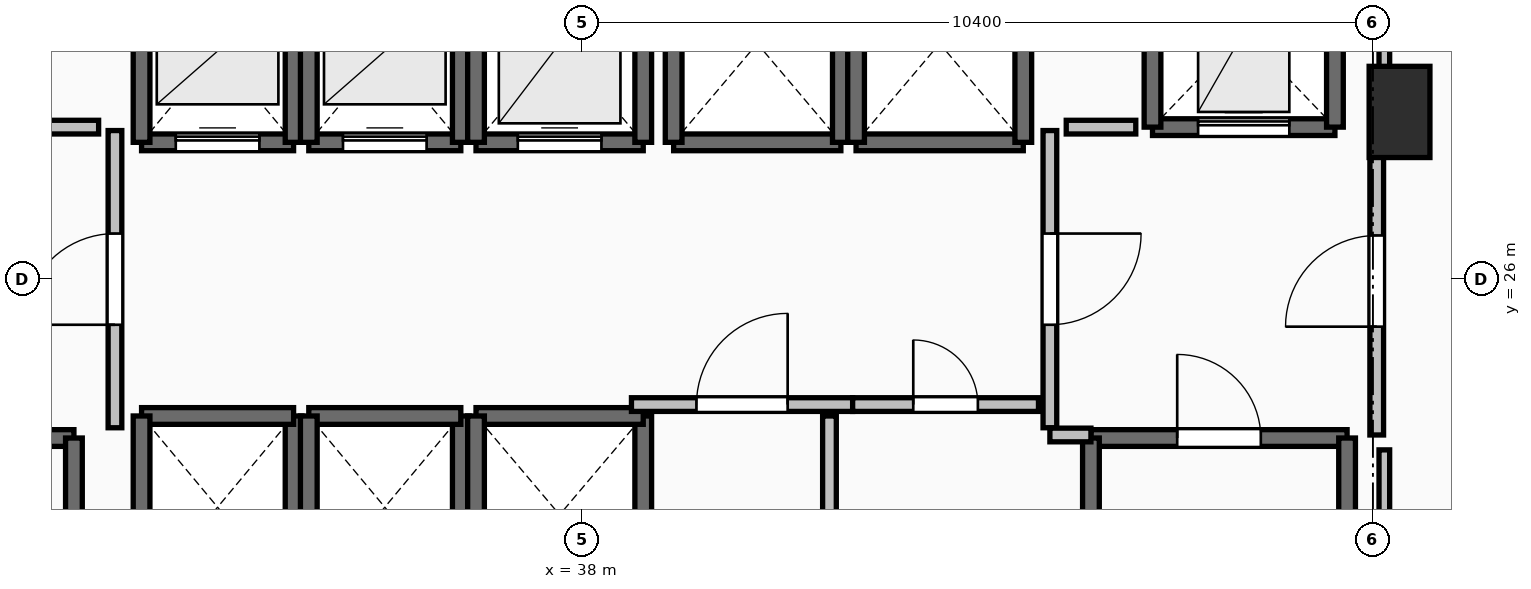
"""IFC4 building model, lengths in metres.
Left out: names, types, materials, properties, quantities, classifications, styles, units other than length and angle.
Written with IfcOpenShell. Run it as: python <this file> out.ifc"""

import sys

from ifc_helpers import new_model, si_unit, direction, frame, frame_2d, origin, origin_2d, place, context, subcontext, project, spatial, rectangle, extrude, element, fill, save


model = new_model("IFC4")
c1 = context("Model", 3, precision=1e-05, world=origin(), true_north=direction((0.0, 1.0)))
c2 = subcontext(c1, "Body", "Model", "MODEL_VIEW")
j1 = project(units=[si_unit("LENGTHUNIT", "METRE"), si_unit("PLANEANGLEUNIT", "RADIAN")], contexts=[c1])
p1 = place(None, origin())
s1 = spatial("IfcSite", under=j1, at=p1, CompositionType="ELEMENT")
p2 = place(p1, origin())
s2 = spatial("IfcBuilding", under=s1, at=p2, CompositionType="ELEMENT")
p3 = place(p2, frame((0.0, 0.0, 120.8)))
s3 = spatial("IfcBuildingStorey", under=s2, at=p3, CompositionType="ELEMENT", Elevation=120.8)
p4 = place(p3, frame((48.75, 28.2, 0.0), z_axis=(0.0, 0.0, 1.0), x_axis=(1.0, 0.0, 0.0)))
e1 = element("IfcColumn", 1, at=p4, inside=s3, PredefinedType="PILASTER", context=c2, shape_type="SweptSolid", body=[
    extrude(rectangle(XDim=0.8, YDim=1.2, at=origin_2d()), origin(), (0.0, 0.0, 1.0), 3.5),
])
p5 = place(p3, frame((27.94, 23.91, 0.0), z_axis=(0.0, 0.0, 1.0), x_axis=(1.0, 0.0, 0.0)))
e2 = element("IfcWall", 2, at=p5, inside=s3, PredefinedType="SOLIDWALL", context=c2, shape_type="SweptSolid", body=[
    extrude(rectangle(XDim=3.37, YDim=0.22, at=frame_2d((1.685, 0.0))), origin(), (0.0, 0.0, 1.0), 3.15),
])
p6 = place(p5, frame((1.135, 0.0, 0.0)))
e3 = element("IfcOpeningElement", 3, at=p6, cuts=e2, PredefinedType="OPENING", context=c2, shape_type="SweptSolid", body=[
    extrude(rectangle(XDim=1.1, YDim=2.15, at=frame_2d((0.55, 1.075))), frame((0.0, 0.125, 0.0), z_axis=(0.0, -1.0, 0.0), x_axis=(1.0, 0.0, 0.0)), (0.0, 0.0, 1.0), 0.25),
])
p7 = place(p3, frame((31.31, 23.91, 0.0), z_axis=(0.0, 0.0, 1.0), x_axis=(0.0, -1.0, 0.0)))
e4 = element("IfcWall", 4, at=p7, inside=s3, PredefinedType="SOLIDWALL", context=c2, shape_type="SweptSolid", body=[
    extrude(rectangle(XDim=7.42, YDim=0.22, at=frame_2d((3.71, 0.0))), origin(), (0.0, 0.0, 1.0), 3.15),
])
p8 = place(p3, frame((44.69, 23.91, 0.0), z_axis=(0.0, 0.0, 1.0), x_axis=(1.0, 0.0, 0.0)))
e5 = element("IfcWall", 5, at=p8, inside=s3, PredefinedType="SOLIDWALL", context=c2, shape_type="SweptSolid", body=[
    extrude(rectangle(XDim=3.37, YDim=0.22, at=frame_2d((1.685, 0.0))), origin(), (0.0, 0.0, 1.0), 3.15),
])
p9 = place(p8, frame((1.135, 0.0, 0.0)))
e6 = element("IfcOpeningElement", 6, at=p9, cuts=e5, PredefinedType="OPENING", context=c2, shape_type="SweptSolid", body=[
    extrude(rectangle(XDim=1.1, YDim=2.15, at=frame_2d((0.55, 1.075))), frame((0.0, 0.125, 0.0), z_axis=(0.0, -1.0, 0.0), x_axis=(1.0, 0.0, 0.0)), (0.0, 0.0, 1.0), 0.25),
])
for number, where, z_axis, x_axis in (
    (7, (48.06, 23.91, 0.0), (0.0, 0.0, 1.0), (0.0, -1.0, 0.0)),
    (8, (44.69, 16.49, 0.0), (0.0, 0.0, 1.0), (0.0, 1.0, 0.0)),
):
    element("IfcWall", number, at=place(p3, frame(where, z_axis=z_axis, x_axis=x_axis)), inside=s3, PredefinedType="SOLIDWALL", context=c2, shape_type="SweptSolid", body=[
        extrude(rectangle(XDim=7.42, YDim=0.22, at=frame_2d((3.71, 0.0))), origin(), (0.0, 0.0, 1.0), 3.15),
    ])
p10 = place(p3, frame((32.2, 27.8, 0.0), z_axis=(0.0, 0.0, 1.0), x_axis=(1.0, 0.0, 0.0)))
e9 = element("IfcWall", 9, at=p10, inside=s3, PredefinedType="SOLIDWALL", context=c2, shape_type="SweptSolid", body=[
    extrude(rectangle(XDim=2.0, YDim=0.22, at=frame_2d((1.0, 0.0))), origin(), (0.0, 0.0, 1.0), 3.15),
])
p11 = place(p10, frame((0.45, 0.0, 0.0)))
e10 = element("IfcOpeningElement", 10, at=p11, cuts=e9, PredefinedType="OPENING", context=c2, shape_type="SweptSolid", body=[
    extrude(rectangle(XDim=1.1, YDim=2.2, at=frame_2d((0.55, 1.1))), frame((0.0, 0.125, 0.0), z_axis=(0.0, -1.0, 0.0), x_axis=(1.0, 0.0, 0.0)), (0.0, 0.0, 1.0), 0.25),
])
for number, where, z_axis, x_axis in (
    (11, (34.2, 27.8, 0.0), (0.0, 0.0, 1.0), (0.0, 1.0, 0.0)),
    (12, (32.2, 30.2, 0.0), (0.0, 0.0, 1.0), (0.0, -1.0, 0.0)),
):
    element("IfcWall", number, at=place(p3, frame(where, z_axis=z_axis, x_axis=x_axis)), inside=s3, PredefinedType="SOLIDWALL", context=c2, shape_type="SweptSolid", body=[
        extrude(rectangle(XDim=2.4, YDim=0.22, at=frame_2d((1.2, 0.0))), origin(), (0.0, 0.0, 1.0), 3.15),
    ])
p12 = place(p3, frame((34.4, 27.8, 0.0), z_axis=(0.0, 0.0, 1.0), x_axis=(1.0, 0.0, 0.0)))
e13 = element("IfcWall", 13, at=p12, inside=s3, PredefinedType="SOLIDWALL", context=c2, shape_type="SweptSolid", body=[
    extrude(rectangle(XDim=2.0, YDim=0.22, at=frame_2d((1.0, 0.0))), origin(), (0.0, 0.0, 1.0), 3.15),
])
p13 = place(p12, frame((0.45, 0.0, 0.0)))
e14 = element("IfcOpeningElement", 14, at=p13, cuts=e13, PredefinedType="OPENING", context=c2, shape_type="SweptSolid", body=[
    extrude(rectangle(XDim=1.1, YDim=2.2, at=frame_2d((0.55, 1.1))), frame((0.0, 0.125, 0.0), z_axis=(0.0, -1.0, 0.0), x_axis=(1.0, 0.0, 0.0)), (0.0, 0.0, 1.0), 0.25),
])
for number, where, z_axis, x_axis in (
    (15, (36.4, 27.8, 0.0), (0.0, 0.0, 1.0), (0.0, 1.0, 0.0)),
    (16, (34.4, 30.2, 0.0), (0.0, 0.0, 1.0), (0.0, -1.0, 0.0)),
):
    element("IfcWall", number, at=place(p3, frame(where, z_axis=z_axis, x_axis=x_axis)), inside=s3, PredefinedType="SOLIDWALL", context=c2, shape_type="SweptSolid", body=[
        extrude(rectangle(XDim=2.4, YDim=0.22, at=frame_2d((1.2, 0.0))), origin(), (0.0, 0.0, 1.0), 3.15),
    ])
p14 = place(p3, frame((36.6, 27.8, 0.0), z_axis=(0.0, 0.0, 1.0), x_axis=(1.0, 0.0, 0.0)))
e17 = element("IfcWall", 17, at=p14, inside=s3, PredefinedType="SOLIDWALL", context=c2, shape_type="SweptSolid", body=[
    extrude(rectangle(XDim=2.2, YDim=0.22, at=frame_2d((1.1, 0.0))), origin(), (0.0, 0.0, 1.0), 3.15),
])
p15 = place(p14, frame((0.55, 0.0, 0.0)))
e18 = element("IfcOpeningElement", 18, at=p15, cuts=e17, PredefinedType="OPENING", context=c2, shape_type="SweptSolid", body=[
    extrude(rectangle(XDim=1.1, YDim=2.2, at=frame_2d((0.55, 1.1))), frame((0.0, 0.125, 0.0), z_axis=(0.0, -1.0, 0.0), x_axis=(1.0, 0.0, 0.0)), (0.0, 0.0, 1.0), 0.25),
])
for number, where, z_axis, x_axis in (
    (19, (38.8, 27.8, 0.0), (0.0, 0.0, 1.0), (0.0, 1.0, 0.0)),
    (20, (36.6, 30.4, 0.0), (0.0, 0.0, 1.0), (0.0, -1.0, 0.0)),
):
    element("IfcWall", number, at=place(p3, frame(where, z_axis=z_axis, x_axis=x_axis)), inside=s3, PredefinedType="SOLIDWALL", context=c2, shape_type="SweptSolid", body=[
        extrude(rectangle(XDim=2.6, YDim=0.22, at=frame_2d((1.3, 0.0))), origin(), (0.0, 0.0, 1.0), 3.15),
    ])
p16 = place(p3, frame((34.2, 21.8, 0.0), z_axis=(0.0, 0.0, 1.0), x_axis=(0.0, 1.0, 0.0)))
e21 = element("IfcWall", 21, at=p16, inside=s3, PredefinedType="SOLIDWALL", context=c2, shape_type="SweptSolid", body=[
    extrude(rectangle(XDim=2.4, YDim=0.22, at=frame_2d((1.2, 0.0))), origin(), (0.0, 0.0, 1.0), 3.15),
])
p17 = place(p3, frame((34.2, 24.2, 0.0), z_axis=(0.0, 0.0, 1.0), x_axis=(-1.0, 0.0, 0.0)))
e22 = element("IfcWall", 22, at=p17, inside=s3, PredefinedType="SOLIDWALL", context=c2, shape_type="SweptSolid", body=[
    extrude(rectangle(XDim=2.0, YDim=0.22, at=frame_2d((1.0, 0.0))), origin(), (0.0, 0.0, 1.0), 3.15),
])
for number, where, z_axis, x_axis in (
    (23, (32.2, 24.2, 0.0), (0.0, 0.0, 1.0), (0.0, -1.0, 0.0)),
    (24, (36.4, 21.8, 0.0), (0.0, 0.0, 1.0), (0.0, 1.0, 0.0)),
):
    element("IfcWall", number, at=place(p3, frame(where, z_axis=z_axis, x_axis=x_axis)), inside=s3, PredefinedType="SOLIDWALL", context=c2, shape_type="SweptSolid", body=[
        extrude(rectangle(XDim=2.4, YDim=0.22, at=frame_2d((1.2, 0.0))), origin(), (0.0, 0.0, 1.0), 3.15),
    ])
p18 = place(p3, frame((36.4, 24.2, 0.0), z_axis=(0.0, 0.0, 1.0), x_axis=(-1.0, 0.0, 0.0)))
e25 = element("IfcWall", 25, at=p18, inside=s3, PredefinedType="SOLIDWALL", context=c2, shape_type="SweptSolid", body=[
    extrude(rectangle(XDim=2.0, YDim=0.22, at=frame_2d((1.0, 0.0))), origin(), (0.0, 0.0, 1.0), 3.15),
])
p19 = place(p3, frame((34.4, 24.2, 0.0), z_axis=(0.0, 0.0, 1.0), x_axis=(0.0, -1.0, 0.0)))
e26 = element("IfcWall", 26, at=p19, inside=s3, PredefinedType="SOLIDWALL", context=c2, shape_type="SweptSolid", body=[
    extrude(rectangle(XDim=2.4, YDim=0.22, at=frame_2d((1.2, 0.0))), origin(), (0.0, 0.0, 1.0), 3.15),
])
p20 = place(p3, frame((38.8, 21.6, 0.0), z_axis=(0.0, 0.0, 1.0), x_axis=(0.0, 1.0, 0.0)))
e27 = element("IfcWall", 27, at=p20, inside=s3, PredefinedType="SOLIDWALL", context=c2, shape_type="SweptSolid", body=[
    extrude(rectangle(XDim=2.6, YDim=0.22, at=frame_2d((1.3, 0.0))), origin(), (0.0, 0.0, 1.0), 3.15),
])
p21 = place(p3, frame((38.8, 24.2, 0.0), z_axis=(0.0, 0.0, 1.0), x_axis=(-1.0, 0.0, 0.0)))
e28 = element("IfcWall", 28, at=p21, inside=s3, PredefinedType="SOLIDWALL", context=c2, shape_type="SweptSolid", body=[
    extrude(rectangle(XDim=2.2, YDim=0.22, at=frame_2d((1.1, 0.0))), origin(), (0.0, 0.0, 1.0), 3.15),
])
p22 = place(p3, frame((36.6, 24.2, 0.0), z_axis=(0.0, 0.0, 1.0), x_axis=(0.0, -1.0, 0.0)))
e29 = element("IfcWall", 29, at=p22, inside=s3, PredefinedType="SOLIDWALL", context=c2, shape_type="SweptSolid", body=[
    extrude(rectangle(XDim=2.6, YDim=0.22, at=frame_2d((1.3, 0.0))), origin(), (0.0, 0.0, 1.0), 3.15),
])
p23 = place(p3, frame((39.2, 27.8, 0.0), z_axis=(0.0, 0.0, 1.0), x_axis=(1.0, 0.0, 0.0)))
e30 = element("IfcWall", 30, at=p23, inside=s3, PredefinedType="SOLIDWALL", context=c2, shape_type="SweptSolid", body=[
    extrude(rectangle(XDim=2.2, YDim=0.22, at=frame_2d((1.1, 0.0))), origin(), (0.0, 0.0, 1.0), 3.15),
])
for number, where, z_axis, x_axis in (
    (31, (41.4, 27.8, 0.0), (0.0, 0.0, 1.0), (0.0, 1.0, 0.0)),
    (32, (39.2, 30.4, 0.0), (0.0, 0.0, 1.0), (0.0, -1.0, 0.0)),
):
    element("IfcWall", number, at=place(p3, frame(where, z_axis=z_axis, x_axis=x_axis)), inside=s3, PredefinedType="SOLIDWALL", context=c2, shape_type="SweptSolid", body=[
        extrude(rectangle(XDim=2.6, YDim=0.22, at=frame_2d((1.3, 0.0))), origin(), (0.0, 0.0, 1.0), 3.15),
    ])
p24 = place(p3, frame((41.6, 27.8, 0.0), z_axis=(0.0, 0.0, 1.0), x_axis=(1.0, 0.0, 0.0)))
e33 = element("IfcWall", 33, at=p24, inside=s3, PredefinedType="SOLIDWALL", context=c2, shape_type="SweptSolid", body=[
    extrude(rectangle(XDim=2.2, YDim=0.22, at=frame_2d((1.1, 0.0))), origin(), (0.0, 0.0, 1.0), 3.15),
])
for number, where, z_axis, x_axis in (
    (34, (43.8, 27.8, 0.0), (0.0, 0.0, 1.0), (0.0, 1.0, 0.0)),
    (35, (41.6, 30.4, 0.0), (0.0, 0.0, 1.0), (0.0, -1.0, 0.0)),
):
    element("IfcWall", number, at=place(p3, frame(where, z_axis=z_axis, x_axis=x_axis)), inside=s3, PredefinedType="SOLIDWALL", context=c2, shape_type="SweptSolid", body=[
        extrude(rectangle(XDim=2.6, YDim=0.22, at=frame_2d((1.3, 0.0))), origin(), (0.0, 0.0, 1.0), 3.15),
    ])
p25 = place(p3, frame((45.5, 28.0, 0.0), z_axis=(0.0, 0.0, 1.0), x_axis=(1.0, 0.0, 0.0)))
e36 = element("IfcWall", 36, at=p25, inside=s3, PredefinedType="SHEAR", context=c2, shape_type="SweptSolid", body=[
    extrude(rectangle(XDim=2.4, YDim=0.22, at=frame_2d((1.2, 0.0))), origin(), (0.0, 0.0, 1.0), 3.15),
])
p26 = place(p25, frame((0.6, 0.0, 0.0)))
e37 = element("IfcOpeningElement", 37, at=p26, cuts=e36, PredefinedType="OPENING", context=c2, shape_type="SweptSolid", body=[
    extrude(rectangle(XDim=1.2, YDim=2.2, at=frame_2d((0.6, 1.1))), frame((0.0, 0.125, 0.0), z_axis=(0.0, -1.0, 0.0), x_axis=(1.0, 0.0, 0.0)), (0.0, 0.0, 1.0), 0.25),
])
for number, where, z_axis, x_axis in (
    (38, (47.9, 28.0, 0.0), (0.0, 0.0, 1.0), (0.0, 1.0, 0.0)),
    (39, (45.5, 30.5, 0.0), (0.0, 0.0, 1.0), (0.0, -1.0, 0.0)),
):
    element("IfcWall", number, at=place(p3, frame(where, z_axis=z_axis, x_axis=x_axis)), inside=s3, PredefinedType="SHEAR", context=c2, shape_type="SweptSolid", body=[
        extrude(rectangle(XDim=2.5, YDim=0.22, at=frame_2d((1.25, 0.0))), origin(), (0.0, 0.0, 1.0), 3.15),
    ])
p27 = place(p3, frame((31.85, 24.045, 0.0), z_axis=(0.0, 0.0, 1.0), x_axis=(0.0, 1.0, 0.0)))
e40 = element("IfcWall", 40, at=p27, inside=s3, PredefinedType="PARTITIONING", context=c2, shape_type="SweptSolid", body=[
    extrude(rectangle(XDim=3.91, YDim=0.18, at=frame_2d((1.955, 0.0))), origin(), (0.0, 0.0, 1.0), 3.15),
])
p28 = place(p27, frame((1.355, 0.0, 0.0)))
e41 = element("IfcOpeningElement", 41, at=p28, cuts=e40, PredefinedType="OPENING", context=c2, shape_type="SweptSolid", body=[
    extrude(rectangle(XDim=1.2, YDim=2.15, at=frame_2d((0.6, 1.075))), frame((0.0, 0.105, 0.0), z_axis=(0.0, -1.0, 0.0), x_axis=(1.0, 0.0, 0.0)), (0.0, 0.0, 1.0), 0.21),
])
p29 = place(p3, frame((44.15, 27.955, 0.0), z_axis=(0.0, 0.0, 1.0), x_axis=(0.0, -1.0, 0.0)))
e42 = element("IfcWall", 42, at=p29, inside=s3, PredefinedType="PARTITIONING", context=c2, shape_type="SweptSolid", body=[
    extrude(rectangle(XDim=3.91, YDim=0.18, at=frame_2d((1.955, 0.0))), origin(), (0.0, 0.0, 1.0), 3.15),
])
p30 = place(p29, frame((1.355, 0.0, 0.0)))
e43 = element("IfcOpeningElement", 43, at=p30, cuts=e42, PredefinedType="OPENING", context=c2, shape_type="SweptSolid", body=[
    extrude(rectangle(XDim=1.2, YDim=2.15, at=frame_2d((0.6, 1.075))), frame((0.0, 0.105, 0.0), z_axis=(0.0, -1.0, 0.0), x_axis=(1.0, 0.0, 0.0)), (0.0, 0.0, 1.0), 0.21),
])
p31 = place(p3, frame((44.15, 23.95, 0.0), z_axis=(0.0, 0.0, 1.0), x_axis=(1.0, 0.0, 0.0)))
e44 = element("IfcWall", 44, at=p31, inside=s3, PredefinedType="PARTITIONING", context=c2, shape_type="SweptSolid", body=[
    extrude(rectangle(XDim=0.54, YDim=0.18, at=frame_2d((0.27, 0.0))), origin(), (0.0, 0.0, 1.0), 3.15),
])
p32 = place(p3, frame((48.45, 23.95, 0.0), z_axis=(0.0, 0.0, 1.0), x_axis=(0.0, 1.0, 0.0)))
e45 = element("IfcWall", 45, at=p32, inside=s3, PredefinedType="PARTITIONING", context=c2, shape_type="SweptSolid", body=[
    extrude(rectangle(XDim=4.05, YDim=0.18, at=frame_2d((2.025, 0.0))), origin(), (0.0, 0.0, 1.0), 3.15),
])
p33 = place(p32, frame((1.425, 0.0, 0.0)))
e46 = element("IfcOpeningElement", 46, at=p33, cuts=e45, PredefinedType="OPENING", context=c2, shape_type="SweptSolid", body=[
    extrude(rectangle(XDim=1.2, YDim=2.15, at=frame_2d((0.6, 1.075))), frame((0.0, 0.105, 0.0), z_axis=(0.0, -1.0, 0.0), x_axis=(1.0, 0.0, 0.0)), (0.0, 0.0, 1.0), 0.21),
])
p34 = place(p3, frame((38.645, 24.35, 0.0), z_axis=(0.0, 0.0, 1.0), x_axis=(1.0, 0.0, 0.0)))
e47 = element("IfcWall", 47, at=p34, inside=s3, PredefinedType="PARTITIONING", context=c2, shape_type="SweptSolid", body=[
    extrude(rectangle(XDim=2.91, YDim=0.18, at=frame_2d((1.455, 0.0))), origin(), (0.0, 0.0, 1.0), 3.15),
])
p35 = place(p34, frame((0.855, 0.0, 0.0)))
e48 = element("IfcOpeningElement", 48, at=p35, cuts=e47, PredefinedType="OPENING", context=c2, shape_type="SweptSolid", body=[
    extrude(rectangle(XDim=1.2, YDim=2.15, at=frame_2d((0.6, 1.075))), frame((0.0, 0.105, 0.0), z_axis=(0.0, -1.0, 0.0), x_axis=(1.0, 0.0, 0.0)), (0.0, 0.0, 1.0), 0.21),
])
p36 = place(p3, frame((41.555, 24.35, 0.0), z_axis=(0.0, 0.0, 1.0), x_axis=(1.0, 0.0, 0.0)))
e49 = element("IfcWall", 49, at=p36, inside=s3, PredefinedType="PARTITIONING", context=c2, shape_type="SweptSolid", body=[
    extrude(rectangle(XDim=2.445, YDim=0.18, at=frame_2d((1.223, 0.0))), origin(), (0.0, 0.0, 1.0), 3.15),
])
p37 = place(p36, frame((0.798, 0.0, 0.0)))
e50 = element("IfcOpeningElement", 50, at=p37, cuts=e49, PredefinedType="OPENING", context=c2, shape_type="SweptSolid", body=[
    extrude(rectangle(XDim=0.85, YDim=2.1, at=frame_2d((0.425, 1.05))), frame((0.0, 0.105, 0.0), z_axis=(0.0, -1.0, 0.0), x_axis=(1.0, 0.0, 0.0)), (0.0, 0.0, 1.0), 0.21),
])
p38 = place(p3, frame((41.25, 20.305, 0.0), z_axis=(0.0, 0.0, 1.0), x_axis=(0.0, 1.0, 0.0)))
e51 = element("IfcWall", 51, at=p38, inside=s3, PredefinedType="PARTITIONING", context=c2, shape_type="SweptSolid", body=[
    extrude(rectangle(XDim=3.895, YDim=0.18, at=frame_2d((1.948, 0.0))), origin(), (0.0, 0.0, 1.0), 3.15),
])
p39 = place(p38, frame((1.522, 0.0, 0.0)))
e52 = element("IfcOpeningElement", 52, at=p39, cuts=e51, PredefinedType="OPENING", context=c2, shape_type="SweptSolid", body=[
    extrude(rectangle(XDim=0.85, YDim=2.1, at=frame_2d((0.425, 1.05))), frame((0.0, 0.105, 0.0), z_axis=(0.0, -1.0, 0.0), x_axis=(1.0, 0.0, 0.0)), (0.0, 0.0, 1.0), 0.21),
])
for number, where, z_axis, x_axis in (
    (53, (31.635, 28.0, 0.0), (0.0, 0.0, 1.0), (-1.0, 0.0, 0.0)),
    (54, (45.28, 28.0, 0.0), (0.0, 0.0, 1.0), (-1.0, 0.0, 0.0)),
):
    element("IfcWall", number, at=place(p3, frame(where, z_axis=z_axis, x_axis=x_axis)), inside=s3, PredefinedType="PARTITIONING", context=c2, shape_type="SweptSolid", body=[
        extrude(rectangle(XDim=0.915, YDim=0.18, at=frame_2d((0.458, 0.0))), origin(), (0.0, 0.0, 1.0), 3.15),
    ])
p40 = place(p3, frame((48.55, 33.45, 0.0), z_axis=(0.0, 0.0, 1.0), x_axis=(0.0, -1.0, 0.0)))
e55 = element("IfcWall", 55, at=p40, inside=s3, PredefinedType="PARTITIONING", context=c2, shape_type="SweptSolid", body=[
    extrude(rectangle(XDim=5.254, YDim=0.14, at=frame_2d((2.627, 0.0))), origin(), (0.0, 0.0, 1.0), 2.342),
])
p41 = place(p3, frame((48.55, 23.754, 0.0), z_axis=(0.0, 0.0, 1.0), x_axis=(0.0, -1.0, 0.0)))
e56 = element("IfcWall", 56, at=p41, inside=s3, PredefinedType="PARTITIONING", context=c2, shape_type="SweptSolid", body=[
    extrude(rectangle(XDim=7.514, YDim=0.14, at=frame_2d((3.757, 0.0))), origin(), (0.0, 0.0, 1.0), 2.342),
])
p42 = place(p9, origin())
e57 = element("IfcDoor", 57, at=p42, inside=s3, OperationType="SINGLE_SWING_LEFT", PredefinedType="DOOR", context=c2, shape_type="SweptSolid", body=[
    extrude(rectangle(XDim=1.1, YDim=2.15, at=frame_2d((0.55, 1.075))), frame((0.0, 0.025, 0.0), z_axis=(0.0, -1.0, 0.0), x_axis=(1.0, 0.0, 0.0)), (0.0, 0.0, 1.0), 0.05),
])
fill(e6, e57)
p43 = place(p11, origin())
e58 = element("IfcDoor", 58, at=p43, inside=s3, OperationType="SLIDING_TO_LEFT", PredefinedType="DOOR", context=c2, shape_type="SweptSolid", body=[
    extrude(rectangle(XDim=1.1, YDim=2.2, at=frame_2d((0.55, 1.1))), frame((0.0, 0.025, 0.0), z_axis=(0.0, -1.0, 0.0), x_axis=(1.0, 0.0, 0.0)), (0.0, 0.0, 1.0), 0.05),
])
fill(e10, e58)
p44 = place(p13, origin())
e59 = element("IfcDoor", 59, at=p44, inside=s3, OperationType="SLIDING_TO_LEFT", PredefinedType="DOOR", context=c2, shape_type="SweptSolid", body=[
    extrude(rectangle(XDim=1.1, YDim=2.2, at=frame_2d((0.55, 1.1))), frame((0.0, 0.025, 0.0), z_axis=(0.0, -1.0, 0.0), x_axis=(1.0, 0.0, 0.0)), (0.0, 0.0, 1.0), 0.05),
])
fill(e14, e59)
p45 = place(p15, origin())
e60 = element("IfcDoor", 60, at=p45, inside=s3, OperationType="SLIDING_TO_LEFT", PredefinedType="DOOR", context=c2, shape_type="SweptSolid", body=[
    extrude(rectangle(XDim=1.1, YDim=2.2, at=frame_2d((0.55, 1.1))), frame((0.0, 0.025, 0.0), z_axis=(0.0, -1.0, 0.0), x_axis=(1.0, 0.0, 0.0)), (0.0, 0.0, 1.0), 0.05),
])
fill(e18, e60)
p46 = place(p26, origin())
e61 = element("IfcDoor", 61, at=p46, inside=s3, OperationType="SLIDING_TO_LEFT", PredefinedType="DOOR", context=c2, shape_type="SweptSolid", body=[
    extrude(rectangle(XDim=1.2, YDim=2.2, at=frame_2d((0.6, 1.1))), frame((0.0, 0.025, 0.0), z_axis=(0.0, -1.0, 0.0), x_axis=(1.0, 0.0, 0.0)), (0.0, 0.0, 1.0), 0.05),
])
fill(e37, e61)
p47 = place(p28, origin())
e62 = element("IfcDoor", 62, at=p47, inside=s3, OperationType="SINGLE_SWING_LEFT", PredefinedType="DOOR", context=c2, shape_type="SweptSolid", body=[
    extrude(rectangle(XDim=1.2, YDim=2.15, at=frame_2d((0.6, 1.075))), frame((0.0, 0.025, 0.0), z_axis=(0.0, -1.0, 0.0), x_axis=(1.0, 0.0, 0.0)), (0.0, 0.0, 1.0), 0.05),
])
fill(e41, e62)
p48 = place(p30, origin())
e63 = element("IfcDoor", 63, at=p48, inside=s3, OperationType="SINGLE_SWING_LEFT", PredefinedType="DOOR", context=c2, shape_type="SweptSolid", body=[
    extrude(rectangle(XDim=1.2, YDim=2.15, at=frame_2d((0.6, 1.075))), frame((0.0, 0.025, 0.0), z_axis=(0.0, -1.0, 0.0), x_axis=(1.0, 0.0, 0.0)), (0.0, 0.0, 1.0), 0.05),
])
fill(e43, e63)
p49 = place(p33, origin())
e64 = element("IfcDoor", 64, at=p49, inside=s3, OperationType="SINGLE_SWING_LEFT", PredefinedType="DOOR", context=c2, shape_type="SweptSolid", body=[
    extrude(rectangle(XDim=1.2, YDim=2.15, at=frame_2d((0.6, 1.075))), frame((0.0, 0.025, 0.0), z_axis=(0.0, -1.0, 0.0), x_axis=(1.0, 0.0, 0.0)), (0.0, 0.0, 1.0), 0.05),
])
fill(e46, e64)
p50 = place(p35, origin())
e65 = element("IfcDoor", 65, at=p50, inside=s3, OperationType="SINGLE_SWING_RIGHT", PredefinedType="DOOR", context=c2, shape_type="SweptSolid", body=[
    extrude(rectangle(XDim=1.2, YDim=2.15, at=frame_2d((0.6, 1.075))), frame((0.0, 0.025, 0.0), z_axis=(0.0, -1.0, 0.0), x_axis=(1.0, 0.0, 0.0)), (0.0, 0.0, 1.0), 0.05),
])
fill(e48, e65)
p51 = place(p37, origin())
e66 = element("IfcDoor", 66, at=p51, inside=s3, OperationType="SINGLE_SWING_LEFT", PredefinedType="DOOR", context=c2, shape_type="SweptSolid", body=[
    extrude(rectangle(XDim=0.85, YDim=2.1, at=frame_2d((0.425, 1.05))), frame((0.0, 0.025, 0.0), z_axis=(0.0, -1.0, 0.0), x_axis=(1.0, 0.0, 0.0)), (0.0, 0.0, 1.0), 0.05),
])
fill(e50, e66)
save(model, sys.argv[1])
